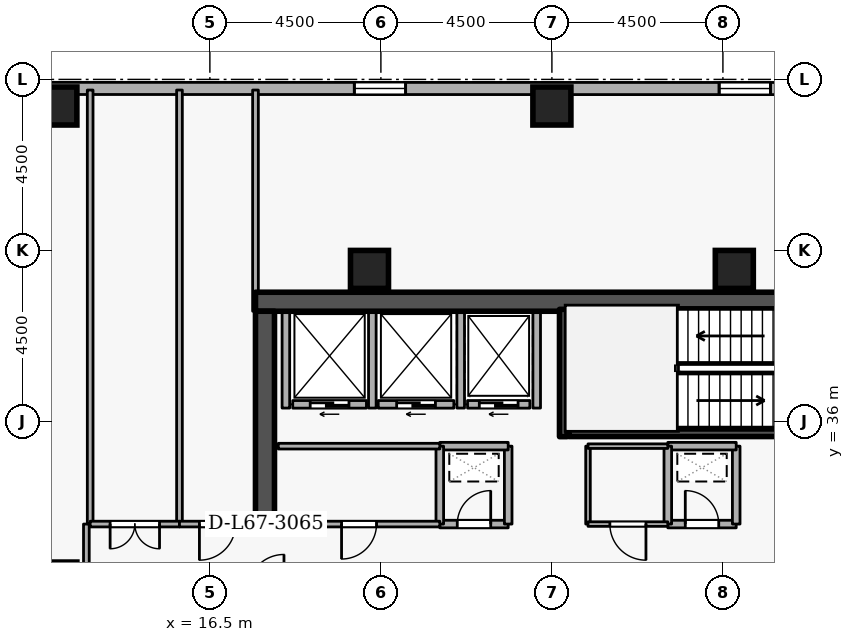
"""IFC4 building model, lengths in metres.
Left out: names, types, materials, properties, quantities, classifications, styles, units other than length and angle.
Written with IfcOpenShell. Run it as: python <this file> out.ifc"""

import sys

from ifc_helpers import new_model, si_unit, direction, frame, frame_2d, origin, origin_2d, place, context, subcontext, project, spatial, rectangle, extrude, element, fill, save


model = new_model("IFC4")
c1 = context("Model", 3, precision=1e-05, world=origin(), true_north=direction((0.0, 1.0)))
c2 = subcontext(c1, "Body", "Model", "MODEL_VIEW")
j1 = project(units=[si_unit("LENGTHUNIT", "METRE"), si_unit("PLANEANGLEUNIT", "RADIAN")], contexts=[c1])
p1 = place(None, origin())
s1 = spatial("IfcSite", under=j1, at=p1, CompositionType="ELEMENT")
p2 = place(p1, origin())
s2 = spatial("IfcBuilding", under=s1, at=p2, CompositionType="ELEMENT")
p3 = place(p2, frame((0.0, 0.0, 251.1)))
s3 = spatial("IfcBuildingStorey", under=s2, at=p3, CompositionType="ELEMENT", Elevation=251.1)
p4 = place(p3, frame((17.7, 39.15, 0.0), z_axis=(0.0, 0.0, 1.0), x_axis=(1.0, 0.0, 0.0)))
e1 = element("IfcWall", 1, at=p4, inside=s3, PredefinedType="SHEAR", context=c2, shape_type="SweptSolid", body=[
    extrude(rectangle(XDim=15.6, YDim=0.5, at=frame_2d((7.8, 0.0))), origin(), (0.0, 0.0, 1.0), 3.6),
])
p5 = place(p3, frame((17.95, 33.1, 0.0), z_axis=(0.0, 0.0, 1.0), x_axis=(0.0, 1.0, 0.0)))
e2 = element("IfcWall", 2, at=p5, inside=s3, PredefinedType="SHEAR", context=c2, shape_type="SweptSolid", body=[
    extrude(rectangle(XDim=5.8, YDim=0.5, at=frame_2d((2.9, 0.0))), origin(), (0.0, 0.0, 1.0), 3.6),
])
for number, where, z_axis, x_axis in (
    (3, (12.5, 44.3, 0.0), (0.0, 0.0, 1.0), (1.0, 0.0, 0.0)),
    (4, (25.5, 44.3, 0.0), (0.0, 0.0, 1.0), (1.0, 0.0, 0.0)),
    (5, (20.7, 40.0, 0.0), (0.0, 0.0, 1.0), (1.0, 0.0, 0.0)),
    (6, (30.3, 40.0, 0.0), (0.0, 0.0, 1.0), (1.0, 0.0, 0.0)),
):
    element("IfcColumn", number, at=place(p3, frame(where, z_axis=z_axis, x_axis=x_axis)), inside=s3, PredefinedType="COLUMN", context=c2, shape_type="SweptSolid", body=[
        extrude(rectangle(XDim=1.0, YDim=1.0, at=origin_2d()), origin(), (0.0, 0.0, 1.0), 3.6),
    ])
p6 = place(p3, frame((38.751, 44.758, 0.0), z_axis=(0.0, 0.0, 1.0), x_axis=(-0.999999983007, 0.000184351399, 0.0)))
e7 = element("IfcWall", 7, at=p6, inside=s3, PredefinedType="STANDARD", context=c2, shape_type="SweptSolid", body=[
    extrude(rectangle(XDim=34.432, YDim=0.32, at=frame_2d((17.216, 0.0))), origin(), (0.0, 0.0, 1.0), 2.22),
])
p7 = place(p6, frame((7.5, 0.0, 0.72)))
e8 = element("IfcOpeningElement", 8, at=p7, cuts=e7, PredefinedType="OPENING", context=c2, shape_type="SweptSolid", body=[
    extrude(rectangle(XDim=1.35, YDim=1.05, at=frame_2d((0.675, 0.525))), frame((0.0, 0.17, 0.0), z_axis=(0.0, -1.0, 0.0), x_axis=(1.0, 0.0, 0.0)), (0.0, 0.0, 1.0), 0.34),
])
p8 = place(p6, frame((17.1, 0.0, 0.72)))
e9 = element("IfcOpeningElement", 9, at=p8, cuts=e7, PredefinedType="OPENING", context=c2, shape_type="SweptSolid", body=[
    extrude(rectangle(XDim=1.35, YDim=1.05, at=frame_2d((0.675, 0.525))), frame((0.0, 0.17, 0.0), z_axis=(0.0, -1.0, 0.0), x_axis=(1.0, 0.0, 0.0)), (0.0, 0.0, 1.0), 0.34),
])
p9 = place(p3, frame((24.92, 36.45, 0.0), z_axis=(0.0, 0.0, 1.0), x_axis=(-1.0, 0.0, 0.0)))
e10 = element("IfcWall", 10, at=p9, inside=s3, PredefinedType="STANDARD", context=c2, shape_type="SweptSolid", body=[
    extrude(rectangle(XDim=1.64, YDim=0.2, at=frame_2d((0.82, 0.0))), origin(), (0.0, 0.0, 1.0), 3.32),
])
p10 = place(p9, frame((0.31, 0.0, 0.0)))
e11 = element("IfcOpeningElement", 11, at=p10, cuts=e10, PredefinedType="OPENING", context=c2, shape_type="SweptSolid", body=[
    extrude(rectangle(XDim=1.02, YDim=2.06, at=frame_2d((0.51, 1.03))), frame((0.0, 0.11, 0.0), z_axis=(0.0, -1.0, 0.0), x_axis=(1.0, 0.0, 0.0)), (0.0, 0.0, 1.0), 0.22),
])
p11 = place(p3, frame((22.92, 36.45, 0.0), z_axis=(0.0, 0.0, 1.0), x_axis=(-1.0, 0.0, 0.0)))
e12 = element("IfcWall", 12, at=p11, inside=s3, PredefinedType="STANDARD", context=c2, shape_type="SweptSolid", body=[
    extrude(rectangle(XDim=1.99, YDim=0.2, at=frame_2d((0.995, 0.0))), origin(), (0.0, 0.0, 1.0), 3.32),
])
p12 = place(p11, frame((0.485, 0.0, 0.0)))
e13 = element("IfcOpeningElement", 13, at=p12, cuts=e12, PredefinedType="OPENING", context=c2, shape_type="SweptSolid", body=[
    extrude(rectangle(XDim=1.02, YDim=2.06, at=frame_2d((0.51, 1.03))), frame((0.0, 0.11, 0.0), z_axis=(0.0, -1.0, 0.0), x_axis=(1.0, 0.0, 0.0)), (0.0, 0.0, 1.0), 0.22),
])
p13 = place(p3, frame((20.62, 36.45, 0.0), z_axis=(0.0, 0.0, 1.0), x_axis=(-1.0, 0.0, 0.0)))
e14 = element("IfcWall", 14, at=p13, inside=s3, PredefinedType="STANDARD", context=c2, shape_type="SweptSolid", body=[
    extrude(rectangle(XDim=1.94, YDim=0.2, at=frame_2d((0.97, 0.0))), origin(), (0.0, 0.0, 1.0), 3.32),
])
p14 = place(p13, frame((0.46, 0.0, 0.0)))
e15 = element("IfcOpeningElement", 15, at=p14, cuts=e14, PredefinedType="OPENING", context=c2, shape_type="SweptSolid", body=[
    extrude(rectangle(XDim=1.02, YDim=2.06, at=frame_2d((0.51, 1.03))), frame((0.0, 0.11, 0.0), z_axis=(0.0, -1.0, 0.0), x_axis=(1.0, 0.0, 0.0)), (0.0, 0.0, 1.0), 0.22),
])
for number, where, z_axis, x_axis in (
    (16, (25.1, 36.352, 0.0), (0.0, 0.0, 1.0), (0.0, 1.0, 0.0)),
    (17, (23.1, 36.352, 0.0), (0.0, 0.0, 1.0), (0.0, 1.0, 0.0)),
    (18, (20.775, 36.352, 0.0), (0.0, 0.0, 1.0), (0.0, 1.0, 0.0)),
    (19, (18.5, 36.352, 0.0), (0.0, 0.0, 1.0), (0.0, 1.0, 0.0)),
):
    element("IfcWall", number, at=place(p3, frame(where, z_axis=z_axis, x_axis=x_axis)), inside=s3, PredefinedType="STANDARD", context=c2, shape_type="SweptSolid", body=[
        extrude(rectangle(XDim=2.536, YDim=0.2, at=frame_2d((1.268, 0.0))), origin(), (0.0, 0.0, 1.0), 3.32),
    ])
p15 = place(p3, frame((25.8, 35.6, 0.0), z_axis=(0.0, 0.0, 1.0), x_axis=(0.0, 1.0, 0.0)))
e20 = element("IfcWall", 20, at=p15, inside=s3, PredefinedType="SHEAR", context=c2, shape_type="SweptSolid", body=[
    extrude(rectangle(XDim=3.35, YDim=0.2, at=frame_2d((1.675, 0.0))), origin(), (0.0, 0.0, 1.0), 3.6),
])
p16 = place(p3, frame((25.95, 35.703, 0.0), z_axis=(0.0, 0.0, 1.0), x_axis=(1.0, 0.0, 0.0)))
e21 = element("IfcWall", 21, at=p16, inside=s3, PredefinedType="SHEAR", context=c2, shape_type="SweptSolid", body=[
    extrude(rectangle(XDim=7.1, YDim=0.2, at=frame_2d((3.55, 0.0))), origin(), (0.0, 0.0, 1.0), 3.6),
])
p17 = place(p3, frame((22.55, 33.3, 0.0), z_axis=(0.0, 0.0, 1.0), x_axis=(1.0, 0.0, 0.0)))
e22 = element("IfcWall", 22, at=p17, inside=s3, PredefinedType="STANDARD", context=c2, shape_type="SweptSolid", body=[
    extrude(rectangle(XDim=1.8, YDim=0.2, at=frame_2d((0.9, 0.0))), origin(), (0.0, 0.0, 1.0), 3.32),
])
p18 = place(p17, frame((0.46, 0.0, 0.0)))
e23 = element("IfcOpeningElement", 23, at=p18, cuts=e22, PredefinedType="OPENING", context=c2, shape_type="SweptSolid", body=[
    extrude(rectangle(XDim=0.88, YDim=2.04, at=frame_2d((0.44, 1.02))), frame((0.0, 0.11, 0.0), z_axis=(0.0, -1.0, 0.0), x_axis=(1.0, 0.0, 0.0)), (0.0, 0.0, 1.0), 0.22),
])
p19 = place(p3, frame((24.35, 33.3, 0.0), z_axis=(0.0, 0.0, 1.0), x_axis=(0.0, 1.0, 0.0)))
e24 = element("IfcWall", 24, at=p19, inside=s3, PredefinedType="STANDARD", context=c2, shape_type="SweptSolid", body=[
    extrude(rectangle(XDim=2.05, YDim=0.2, at=frame_2d((1.025, 0.0))), origin(), (0.0, 0.0, 1.0), 3.32),
])
p20 = place(p3, frame((24.35, 35.35, 0.0), z_axis=(0.0, 0.0, 1.0), x_axis=(-1.0, 0.0, 0.0)))
e25 = element("IfcWall", 25, at=p20, inside=s3, PredefinedType="STANDARD", context=c2, shape_type="SweptSolid", body=[
    extrude(rectangle(XDim=1.8, YDim=0.2, at=frame_2d((0.9, 0.0))), origin(), (0.0, 0.0, 1.0), 3.32),
])
p21 = place(p3, frame((22.55, 35.35, 0.0), z_axis=(0.0, 0.0, 1.0), x_axis=(0.0, -1.0, 0.0)))
e26 = element("IfcWall", 26, at=p21, inside=s3, PredefinedType="STANDARD", context=c2, shape_type="SweptSolid", body=[
    extrude(rectangle(XDim=2.05, YDim=0.2, at=frame_2d((1.025, 0.0))), origin(), (0.0, 0.0, 1.0), 3.32),
])
p22 = place(p3, frame((28.55, 33.3, 0.0), z_axis=(0.0, 0.0, 1.0), x_axis=(1.0, 0.0, 0.0)))
e27 = element("IfcWall", 27, at=p22, inside=s3, PredefinedType="STANDARD", context=c2, shape_type="SweptSolid", body=[
    extrude(rectangle(XDim=1.8, YDim=0.2, at=frame_2d((0.9, 0.0))), origin(), (0.0, 0.0, 1.0), 3.32),
])
p23 = place(p22, frame((0.46, 0.0, 0.0)))
e28 = element("IfcOpeningElement", 28, at=p23, cuts=e27, PredefinedType="OPENING", context=c2, shape_type="SweptSolid", body=[
    extrude(rectangle(XDim=0.88, YDim=2.04, at=frame_2d((0.44, 1.02))), frame((0.0, 0.11, 0.0), z_axis=(0.0, -1.0, 0.0), x_axis=(1.0, 0.0, 0.0)), (0.0, 0.0, 1.0), 0.22),
])
p24 = place(p3, frame((30.35, 33.3, 0.0), z_axis=(0.0, 0.0, 1.0), x_axis=(0.0, 1.0, 0.0)))
e29 = element("IfcWall", 29, at=p24, inside=s3, PredefinedType="STANDARD", context=c2, shape_type="SweptSolid", body=[
    extrude(rectangle(XDim=2.05, YDim=0.2, at=frame_2d((1.025, 0.0))), origin(), (0.0, 0.0, 1.0), 3.32),
])
p25 = place(p3, frame((30.35, 35.35, 0.0), z_axis=(0.0, 0.0, 1.0), x_axis=(-1.0, 0.0, 0.0)))
e30 = element("IfcWall", 30, at=p25, inside=s3, PredefinedType="STANDARD", context=c2, shape_type="SweptSolid", body=[
    extrude(rectangle(XDim=1.8, YDim=0.2, at=frame_2d((0.9, 0.0))), origin(), (0.0, 0.0, 1.0), 3.32),
])
p26 = place(p3, frame((28.55, 35.35, 0.0), z_axis=(0.0, 0.0, 1.0), x_axis=(0.0, -1.0, 0.0)))
e31 = element("IfcWall", 31, at=p26, inside=s3, PredefinedType="STANDARD", context=c2, shape_type="SweptSolid", body=[
    extrude(rectangle(XDim=2.05, YDim=0.2, at=frame_2d((1.025, 0.0))), origin(), (0.0, 0.0, 1.0), 3.32),
])
p27 = place(p3, frame((18.3, 35.35, 0.0), z_axis=(0.0, 0.0, 1.0), x_axis=(1.0, 0.0, 0.0)))
e32 = element("IfcWall", 32, at=p27, inside=s3, PredefinedType="PARTITIONING", context=c2, shape_type="SweptSolid", body=[
    extrude(rectangle(XDim=4.25, YDim=0.15, at=frame_2d((2.125, 0.0))), origin(), (0.0, 0.0, 1.0), 3.32),
])
p28 = place(p3, frame((22.55, 33.3, 0.0), z_axis=(0.0, 0.0, 1.0), x_axis=(-1.0, 0.0, 0.0)))
e33 = element("IfcWall", 33, at=p28, inside=s3, PredefinedType="PARTITIONING", context=c2, shape_type="SweptSolid", body=[
    extrude(rectangle(XDim=4.25, YDim=0.15, at=frame_2d((2.125, 0.0))), origin(), (0.0, 0.0, 1.0), 3.32),
])
p29 = place(p28, frame((1.665, 0.0, 0.0)))
e34 = element("IfcOpeningElement", 34, at=p29, cuts=e33, PredefinedType="OPENING", context=c2, shape_type="SweptSolid", body=[
    extrude(rectangle(XDim=0.92, YDim=2.08, at=frame_2d((0.46, 1.04))), frame((0.0, 0.085, 0.0), z_axis=(0.0, -1.0, 0.0), x_axis=(1.0, 0.0, 0.0)), (0.0, 0.0, 1.0), 0.17),
])
p30 = place(p3, frame((26.45, 33.3, 0.0), z_axis=(0.0, 0.0, 1.0), x_axis=(0.0, 1.0, 0.0)))
e35 = element("IfcWall", 35, at=p30, inside=s3, PredefinedType="PARTITIONING", context=c2, shape_type="SweptSolid", body=[
    extrude(rectangle(XDim=2.05, YDim=0.12, at=frame_2d((1.025, 0.0))), origin(), (0.0, 0.0, 1.0), 3.32),
])
p31 = place(p3, frame((26.45, 35.35, 0.0), z_axis=(0.0, 0.0, 1.0), x_axis=(1.0, 0.0, 0.0)))
e36 = element("IfcWall", 36, at=p31, inside=s3, PredefinedType="PARTITIONING", context=c2, shape_type="SweptSolid", body=[
    extrude(rectangle(XDim=2.1, YDim=0.12, at=frame_2d((1.05, 0.0))), origin(), (0.0, 0.0, 1.0), 3.32),
])
p32 = place(p3, frame((28.55, 33.3, 0.0), z_axis=(0.0, 0.0, 1.0), x_axis=(-1.0, 0.0, 0.0)))
e37 = element("IfcWall", 37, at=p32, inside=s3, PredefinedType="PARTITIONING", context=c2, shape_type="SweptSolid", body=[
    extrude(rectangle(XDim=2.1, YDim=0.12, at=frame_2d((1.05, 0.0))), origin(), (0.0, 0.0, 1.0), 3.32),
])
p33 = place(p32, frame((0.575, 0.0, 0.0)))
e38 = element("IfcOpeningElement", 38, at=p33, cuts=e37, PredefinedType="OPENING", context=c2, shape_type="SweptSolid", body=[
    extrude(rectangle(XDim=0.95, YDim=2.1, at=frame_2d((0.475, 1.05))), frame((0.0, 0.07, 0.0), z_axis=(0.0, -1.0, 0.0), x_axis=(1.0, 0.0, 0.0)), (0.0, 0.0, 1.0), 0.14),
])
for number, where, z_axis, x_axis in (
    (39, (13.35, 33.3, 0.0), (0.0, 0.0, 1.0), (0.0, 1.0, 0.0)),
    (40, (15.7, 44.72, 0.0), (0.0, 0.0, 1.0), (0.0, -1.0, 0.0)),
):
    element("IfcWall", number, at=place(p3, frame(where, z_axis=z_axis, x_axis=x_axis)), inside=s3, PredefinedType="PARTITIONING", context=c2, shape_type="SweptSolid", body=[
        extrude(rectangle(XDim=11.42, YDim=0.15, at=frame_2d((5.71, 0.0))), origin(), (0.0, 0.0, 1.0), 3.32),
    ])
p34 = place(p3, frame((15.7, 33.3, 0.0), z_axis=(0.0, 0.0, 1.0), x_axis=(-1.0, 0.0, 0.0)))
e41 = element("IfcWall", 41, at=p34, inside=s3, PredefinedType="PARTITIONING", context=c2, shape_type="SweptSolid", body=[
    extrude(rectangle(XDim=2.35, YDim=0.15, at=frame_2d((1.175, 0.0))), origin(), (0.0, 0.0, 1.0), 3.32),
])
p35 = place(p34, frame((0.525, 0.0, 0.0)))
e42 = element("IfcOpeningElement", 42, at=p35, cuts=e41, PredefinedType="OPENING", context=c2, shape_type="SweptSolid", body=[
    extrude(rectangle(XDim=1.3, YDim=2.12, at=frame_2d((0.65, 1.06))), frame((0.0, 0.085, 0.0), z_axis=(0.0, -1.0, 0.0), x_axis=(1.0, 0.0, 0.0)), (0.0, 0.0, 1.0), 0.17),
])
p36 = place(p3, frame((17.7, 44.72, 0.0), z_axis=(0.0, 0.0, 1.0), x_axis=(0.0, -1.0, 0.0)))
e43 = element("IfcWall", 43, at=p36, inside=s3, PredefinedType="PARTITIONING", context=c2, shape_type="SweptSolid", body=[
    extrude(rectangle(XDim=5.82, YDim=0.15, at=frame_2d((2.91, 0.0))), origin(), (0.0, 0.0, 1.0), 2.525),
])
p37 = place(p3, frame((17.7, 33.3, 0.0), z_axis=(0.0, 0.0, 1.0), x_axis=(-1.0, 0.0, 0.0)))
e44 = element("IfcWall", 44, at=p37, inside=s3, PredefinedType="PARTITIONING", context=c2, shape_type="SweptSolid", body=[
    extrude(rectangle(XDim=2.0, YDim=0.15, at=frame_2d((1.0, 0.0))), origin(), (0.0, 0.0, 1.0), 3.32),
])
p38 = place(p37, frame((0.525, 0.0, 0.0)))
e45 = element("IfcOpeningElement", 45, at=p38, cuts=e44, PredefinedType="OPENING", context=c2, shape_type="SweptSolid", body=[
    extrude(rectangle(XDim=0.95, YDim=2.1, at=frame_2d((0.475, 1.05))), frame((0.0, 0.085, 0.0), z_axis=(0.0, -1.0, 0.0), x_axis=(1.0, 0.0, 0.0)), (0.0, 0.0, 1.0), 0.17),
])
p39 = place(p3, frame((13.25, 33.3, 0.0), z_axis=(0.0, 0.0, 1.0), x_axis=(0.0, -1.0, 0.0)))
e46 = element("IfcWall", 46, at=p39, inside=s3, PredefinedType="PARTITIONING", context=c2, shape_type="SweptSolid", body=[
    extrude(rectangle(XDim=1.75, YDim=0.15, at=frame_2d((0.875, 0.0))), origin(), (0.0, 0.0, 1.0), 3.32),
])
p40 = place(p7, origin())
e47 = element("IfcWindow", 47, at=p40, inside=s3, PartitioningType="SINGLE_PANEL", PredefinedType="WINDOW", context=c2, shape_type="SweptSolid", body=[
    extrude(rectangle(XDim=1.35, YDim=1.05, at=frame_2d((0.675, 0.525))), frame((0.0, 0.03, 0.0), z_axis=(0.0, -1.0, 0.0), x_axis=(1.0, 0.0, 0.0)), (0.0, 0.0, 1.0), 0.06),
])
fill(e8, e47)
p41 = place(p8, origin())
e48 = element("IfcWindow", 48, at=p41, inside=s3, PartitioningType="SINGLE_PANEL", PredefinedType="WINDOW", context=c2, shape_type="SweptSolid", body=[
    extrude(rectangle(XDim=1.35, YDim=1.05, at=frame_2d((0.675, 0.525))), frame((0.0, 0.03, 0.0), z_axis=(0.0, -1.0, 0.0), x_axis=(1.0, 0.0, 0.0)), (0.0, 0.0, 1.0), 0.06),
])
fill(e9, e48)
p42 = place(p10, origin())
e49 = element("IfcDoor", 49, at=p42, inside=s3, OperationType="SLIDING_TO_LEFT", PredefinedType="DOOR", context=c2, shape_type="SweptSolid", body=[
    extrude(rectangle(XDim=1.02, YDim=2.06, at=frame_2d((0.51, 1.03))), frame((0.0, 0.025, 0.0), z_axis=(0.0, -1.0, 0.0), x_axis=(1.0, 0.0, 0.0)), (0.0, 0.0, 1.0), 0.05),
])
fill(e11, e49)
p43 = place(p12, origin())
e50 = element("IfcDoor", 50, at=p43, inside=s3, OperationType="SLIDING_TO_LEFT", PredefinedType="DOOR", context=c2, shape_type="SweptSolid", body=[
    extrude(rectangle(XDim=1.02, YDim=2.06, at=frame_2d((0.51, 1.03))), frame((0.0, 0.025, 0.0), z_axis=(0.0, -1.0, 0.0), x_axis=(1.0, 0.0, 0.0)), (0.0, 0.0, 1.0), 0.05),
])
fill(e13, e50)
p44 = place(p14, origin())
e51 = element("IfcDoor", 51, at=p44, inside=s3, OperationType="SLIDING_TO_LEFT", PredefinedType="DOOR", context=c2, shape_type="SweptSolid", body=[
    extrude(rectangle(XDim=1.02, YDim=2.06, at=frame_2d((0.51, 1.03))), frame((0.0, 0.025, 0.0), z_axis=(0.0, -1.0, 0.0), x_axis=(1.0, 0.0, 0.0)), (0.0, 0.0, 1.0), 0.05),
])
fill(e15, e51)
p45 = place(p18, origin())
e52 = element("IfcDoor", 52, at=p45, inside=s3, OperationType="SINGLE_SWING_RIGHT", PredefinedType="DOOR", context=c2, shape_type="SweptSolid", body=[
    extrude(rectangle(XDim=0.88, YDim=2.04, at=frame_2d((0.44, 1.02))), frame((0.0, 0.025, 0.0), z_axis=(0.0, -1.0, 0.0), x_axis=(1.0, 0.0, 0.0)), (0.0, 0.0, 1.0), 0.05),
])
fill(e23, e52)
p46 = place(p23, origin())
e53 = element("IfcDoor", 53, at=p46, inside=s3, OperationType="SINGLE_SWING_LEFT", PredefinedType="DOOR", context=c2, shape_type="SweptSolid", body=[
    extrude(rectangle(XDim=0.88, YDim=2.04, at=frame_2d((0.44, 1.02))), frame((0.0, 0.025, 0.0), z_axis=(0.0, -1.0, 0.0), x_axis=(1.0, 0.0, 0.0)), (0.0, 0.0, 1.0), 0.05),
])
fill(e28, e53)
p47 = place(p29, origin())
e54 = element("IfcDoor", 54, at=p47, inside=s3, OperationType="SINGLE_SWING_RIGHT", PredefinedType="DOOR", context=c2, shape_type="SweptSolid", body=[
    extrude(rectangle(XDim=0.92, YDim=2.08, at=frame_2d((0.46, 1.04))), frame((0.0, 0.025, 0.0), z_axis=(0.0, -1.0, 0.0), x_axis=(1.0, 0.0, 0.0)), (0.0, 0.0, 1.0), 0.05),
])
fill(e34, e54)
p48 = place(p33, origin())
e55 = element("IfcDoor", 55, at=p48, inside=s3, OperationType="SINGLE_SWING_LEFT", PredefinedType="DOOR", context=c2, shape_type="SweptSolid", body=[
    extrude(rectangle(XDim=0.95, YDim=2.1, at=frame_2d((0.475, 1.05))), frame((0.0, 0.025, 0.0), z_axis=(0.0, -1.0, 0.0), x_axis=(1.0, 0.0, 0.0)), (0.0, 0.0, 1.0), 0.05),
])
fill(e38, e55)
p49 = place(p35, origin())
e56 = element("IfcDoor", 56, at=p49, inside=s3, OperationType="DOUBLE_DOOR_SINGLE_SWING", PredefinedType="DOOR", context=c2, shape_type="SweptSolid", body=[
    extrude(rectangle(XDim=1.3, YDim=2.12, at=frame_2d((0.65, 1.06))), frame((0.0, 0.025, 0.0), z_axis=(0.0, -1.0, 0.0), x_axis=(1.0, 0.0, 0.0)), (0.0, 0.0, 1.0), 0.05),
])
fill(e42, e56)
p50 = place(p38, origin())
e57 = element("IfcDoor", 57, at=p50, inside=s3, OperationType="SINGLE_SWING_RIGHT", PredefinedType="DOOR", context=c2, shape_type="SweptSolid", body=[
    extrude(rectangle(XDim=0.95, YDim=2.1, at=frame_2d((0.475, 1.05))), frame((0.0, 0.025, 0.0), z_axis=(0.0, -1.0, 0.0), x_axis=(1.0, 0.0, 0.0)), (0.0, 0.0, 1.0), 0.05),
])
fill(e45, e57)
save(model, sys.argv[1])
